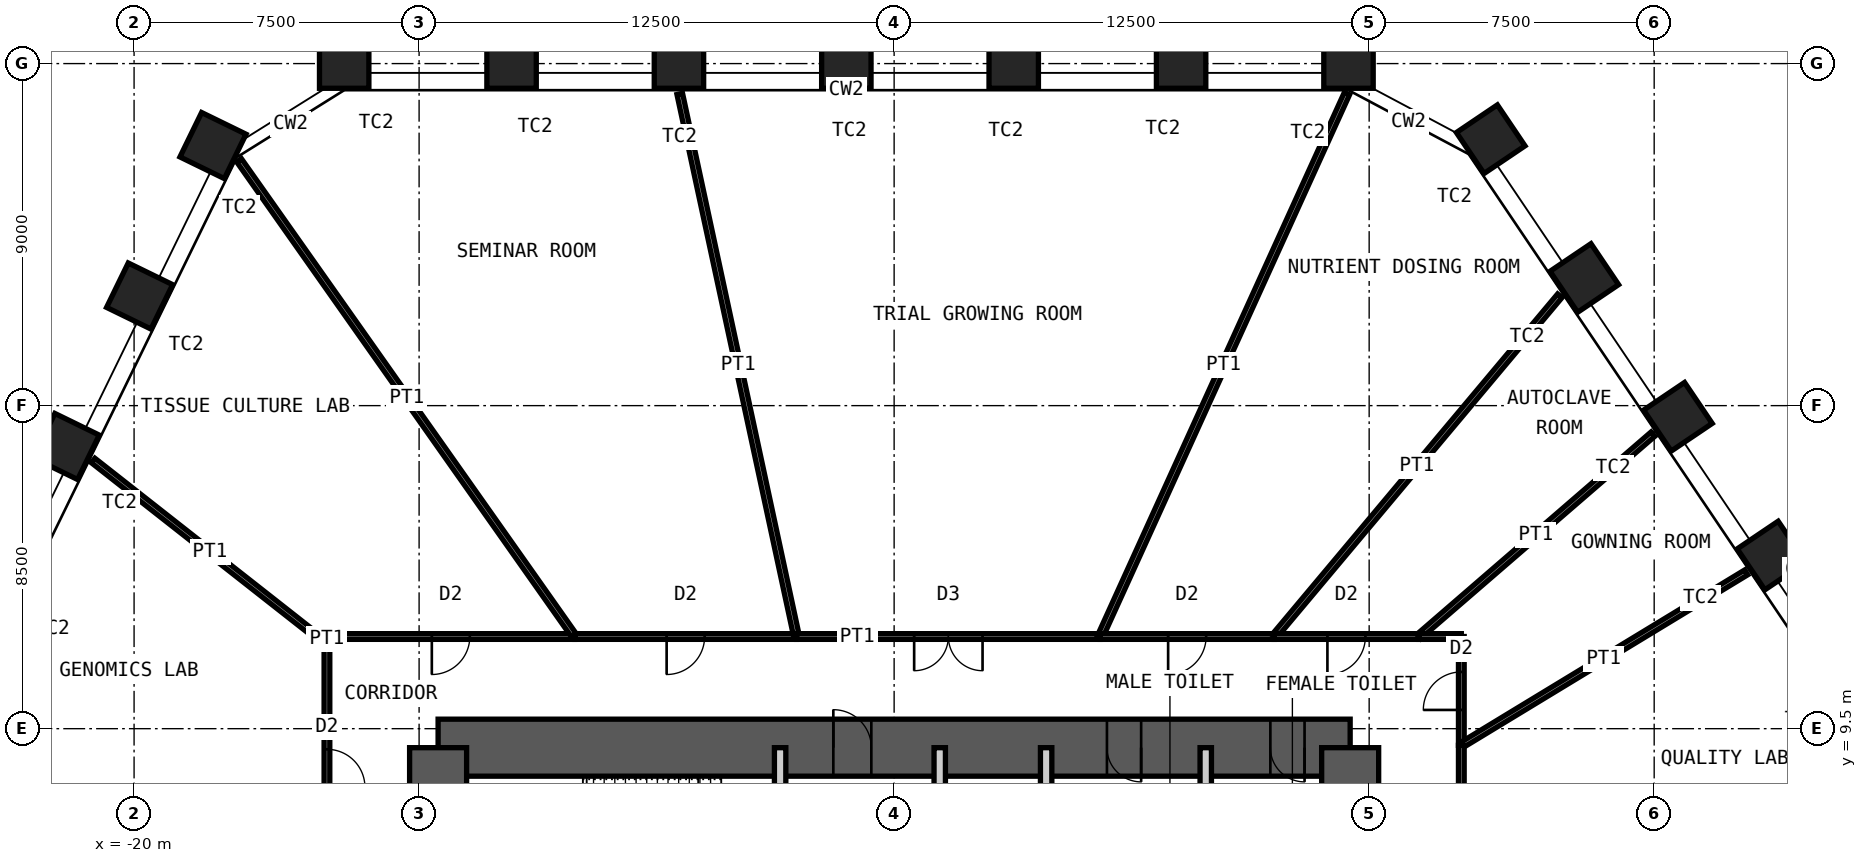
"""IFC4 building model, lengths in metres.
Left out: names, types, materials, properties, quantities, classifications, styles, units other than length and angle.
Written with IfcOpenShell. Run it as: python <this file> out.ifc"""

import sys

from ifc_helpers import new_model, si_unit, direction, frame, frame_2d, origin, origin_2d, place, context, subcontext, project, spatial, rectangle, hollow_rectangle, extrude, element, fill, save


model = new_model("IFC4")
c1 = context("Model", 3, precision=1e-05, world=origin(), true_north=direction((0.0, 1.0)))
c2 = subcontext(c1, "Body", "Model", "MODEL_VIEW")
j1 = project(units=[si_unit("LENGTHUNIT", "METRE"), si_unit("PLANEANGLEUNIT", "RADIAN")], contexts=[c1])
p1 = place(None, origin())
s1 = spatial("IfcSite", under=j1, at=p1, CompositionType="ELEMENT")
p2 = place(p1, origin())
s2 = spatial("IfcBuilding", under=s1, at=p2, CompositionType="ELEMENT")
p3 = place(p2, frame((0.0, 0.0, 82.0)))
s3 = spatial("IfcBuildingStorey", under=s2, at=p3, CompositionType="ELEMENT", Elevation=82.0)
for number, where, z_axis, x_axis in (
    (1, (-14.471, 27.0, 0.0), (0.0, 0.0, 1.0), (-1.0, 0.0, 0.0)),
    (2, (-10.067, 27.0, 0.0), (0.0, 0.0, 1.0), (-1.0, 0.0, 0.0)),
    (3, (-5.662, 27.0, 0.0), (0.0, 0.0, 1.0), (-1.0, 0.0, 0.0)),
    (4, (-1.258, 27.0, 0.0), (0.0, 0.0, 1.0), (-1.0, 0.0, 0.0)),
    (5, (3.147, 27.0, 0.0), (0.0, 0.0, 1.0), (-1.0, 0.0, 0.0)),
    (6, (7.552, 27.0, 0.0), (0.0, 0.0, 1.0), (-1.0, 0.0, 0.0)),
    (7, (11.956, 27.0, 0.0), (0.0, 0.0, 1.0), (-1.0, 0.0, 0.0)),
    (8, (15.698, 25.01, 0.0), (0.0, 0.0, 1.0), (-0.559, 0.829, 0.0)),
    (9, (18.161, 21.359, 0.0), (0.0, 0.0, 1.0), (-0.559, 0.829, 0.0)),
    (10, (20.624, 17.707, 0.0), (0.0, 0.0, 1.0), (-0.559, 0.829, 0.0)),
    (11, (23.087, 14.056, 0.0), (0.0, 0.0, 1.0), (-0.559, 0.829, 0.0)),
    (12, (-21.785, 16.925, 0.0), (0.0, 0.0, 1.0), (-0.438, -0.899, 0.0)),
    (13, (-19.854, 20.884, 0.0), (0.0, 0.0, 1.0), (-0.438, -0.899, 0.0)),
    (14, (-17.924, 24.843, 0.0), (0.0, 0.0, 1.0), (-0.438, -0.899, 0.0)),
):
    element("IfcColumn", number, at=place(p3, frame(where, z_axis=z_axis, x_axis=x_axis)), inside=s3, PredefinedType="COLUMN", context=c2, shape_type="SweptSolid", body=[
        extrude(hollow_rectangle(XDim=1.3, YDim=1.3, WallThickness=0.1, at=origin_2d()), origin(), (0.0, 0.0, 1.0), 5.0),
    ])
p4 = place(p3, frame((-12.0, 9.0, 0.0), z_axis=(0.0, 0.0, 1.0), x_axis=(1.0, 0.0, 0.0)))
e15 = element("IfcWall", 15, at=p4, inside=s3, PredefinedType="SHEAR", context=c2, shape_type="SweptSolid", body=[
    extrude(rectangle(XDim=24.0, YDim=1.5, at=frame_2d((12.0, 0.0))), origin(), (0.0, 0.0, 1.0), 5.0),
])
p5 = place(p4, frame((10.4, 0.0, 0.0)))
e16 = element("IfcOpeningElement", 16, at=p5, cuts=e15, PredefinedType="OPENING", context=c2, shape_type="SweptSolid", body=[
    extrude(rectangle(XDim=1.0, YDim=2.1, at=frame_2d((0.5, 1.05))), frame((0.0, 0.76, 0.0), z_axis=(0.0, -1.0, 0.0), x_axis=(1.0, 0.0, 0.0)), (0.0, 0.0, 1.0), 1.52),
])
p6 = place(p4, frame((17.6, 0.0, 0.0)))
e17 = element("IfcOpeningElement", 17, at=p6, cuts=e15, PredefinedType="OPENING", context=c2, shape_type="SweptSolid", body=[
    extrude(rectangle(XDim=0.9, YDim=2.1, at=frame_2d((0.45, 1.05))), frame((0.0, 0.76, 0.0), z_axis=(0.0, -1.0, 0.0), x_axis=(1.0, 0.0, 0.0)), (0.0, 0.0, 1.0), 1.52),
])
p7 = place(p4, frame((21.9, 0.0, 0.0)))
e18 = element("IfcOpeningElement", 18, at=p7, cuts=e15, PredefinedType="OPENING", context=c2, shape_type="SweptSolid", body=[
    extrude(rectangle(XDim=0.9, YDim=2.1, at=frame_2d((0.45, 1.05))), frame((0.0, 0.76, 0.0), z_axis=(0.0, -1.0, 0.0), x_axis=(1.0, 0.0, 0.0)), (0.0, 0.0, 1.0), 1.52),
])
p8 = place(p3, frame((12.0, -9.0, 0.0), z_axis=(0.0, 0.0, 1.0), x_axis=(0.0, 1.0, 0.0)))
e19 = element("IfcWall", 19, at=p8, inside=s3, PredefinedType="SHEAR", context=c2, shape_type="SweptSolid", body=[
    extrude(rectangle(XDim=18.0, YDim=1.5, at=frame_2d((9.0, 0.0))), origin(), (0.0, 0.0, 1.0), 5.0),
])
p9 = place(p8, frame((8.1, 0.0, 0.0)))
e20 = element("IfcOpeningElement", 20, at=p9, cuts=e19, PredefinedType="OPENING", context=c2, shape_type="SweptSolid", body=[
    extrude(rectangle(XDim=1.8, YDim=2.1, at=frame_2d((0.9, 1.05))), frame((0.0, 0.76, 0.0), z_axis=(0.0, -1.0, 0.0), x_axis=(1.0, 0.0, 0.0)), (0.0, 0.0, 1.0), 1.52),
])
p10 = place(p3, frame((-12.0, -9.0, 0.0), z_axis=(0.0, 0.0, 1.0), x_axis=(0.0, 1.0, 0.0)))
e21 = element("IfcWall", 21, at=p10, inside=s3, PredefinedType="SHEAR", context=c2, shape_type="SweptSolid", body=[
    extrude(rectangle(XDim=18.0, YDim=1.5, at=frame_2d((9.0, 0.0))), origin(), (0.0, 0.0, 1.0), 5.0),
])
p11 = place(p10, frame((8.1, 0.0, 0.0)))
e22 = element("IfcOpeningElement", 22, at=p11, cuts=e21, PredefinedType="OPENING", context=c2, shape_type="SweptSolid", body=[
    extrude(rectangle(XDim=1.8, YDim=2.1, at=frame_2d((0.9, 1.05))), frame((0.0, 0.76, 0.0), z_axis=(0.0, -1.0, 0.0), x_axis=(1.0, 0.0, 0.0)), (0.0, 0.0, 1.0), 1.52),
])
p12 = place(p3, frame((-3.0, 5.15, 0.0), z_axis=(0.0, 0.0, 1.0), x_axis=(0.0, 1.0, 0.0)))
e23 = element("IfcWall", 23, at=p12, inside=s3, PredefinedType="PARTITIONING", context=c2, shape_type="SweptSolid", body=[
    extrude(rectangle(XDim=3.85, YDim=0.3, at=frame_2d((1.925, 0.0))), origin(), (0.0, 0.0, 1.0), 4.78),
])
p13 = place(p12, frame((1.425, 0.0, 0.0)))
e24 = element("IfcOpeningElement", 24, at=p13, cuts=e23, PredefinedType="OPENING", context=c2, shape_type="SweptSolid", body=[
    extrude(rectangle(XDim=1.0, YDim=2.1, at=frame_2d((0.5, 1.05))), frame((0.0, 0.16, 0.0), z_axis=(0.0, -1.0, 0.0), x_axis=(1.0, 0.0, 0.0)), (0.0, 0.0, 1.0), 0.32),
])
p14 = place(p3, frame((1.2, 5.15, 0.0), z_axis=(0.0, 0.0, 1.0), x_axis=(0.0, 1.0, 0.0)))
e25 = element("IfcWall", 25, at=p14, inside=s3, PredefinedType="PARTITIONING", context=c2, shape_type="SweptSolid", body=[
    extrude(rectangle(XDim=3.85, YDim=0.3, at=frame_2d((1.925, 0.0))), origin(), (0.0, 0.0, 1.0), 4.78),
])
p15 = place(p14, frame((1.375, 0.0, 0.0)))
e26 = element("IfcOpeningElement", 26, at=p15, cuts=e25, PredefinedType="OPENING", context=c2, shape_type="SweptSolid", body=[
    extrude(rectangle(XDim=1.1, YDim=2.4, at=frame_2d((0.55, 1.2))), frame((0.0, 0.16, 0.0), z_axis=(0.0, -1.0, 0.0), x_axis=(1.0, 0.0, 0.0)), (0.0, 0.0, 1.0), 0.32),
])
for number, where, z_axis, x_axis in (
    (27, (4.0, 5.15, 0.0), (0.0, 0.0, 1.0), (0.0, 1.0, 0.0)),
    (28, (8.2, 5.15, 0.0), (0.0, 0.0, 1.0), (0.0, 1.0, 0.0)),
):
    element("IfcWall", number, at=place(p3, frame(where, z_axis=z_axis, x_axis=x_axis)), inside=s3, PredefinedType="PARTITIONING", context=c2, shape_type="SweptSolid", body=[
        extrude(rectangle(XDim=3.85, YDim=0.3, at=frame_2d((1.925, 0.0))), origin(), (0.0, 0.0, 1.0), 4.78),
    ])
p16 = place(p3, frame((-24.923, 8.668, 0.0), z_axis=(0.0, 0.0, 1.0), x_axis=(0.944507686068, -0.328489316354, 0.0)))
e29 = element("IfcWall", 29, at=p16, inside=s3, PredefinedType="PARTITIONING", context=c2, shape_type="SweptSolid", body=[
    extrude(rectangle(XDim=10.586, YDim=0.15, at=frame_2d((5.293, 0.0))), origin(), (0.0, 0.0, 1.0), 3.7),
])
p17 = place(p3, frame((-14.925, 5.191, 0.0), z_axis=(0.0, 0.0, 1.0), x_axis=(0.0, 1.0, 0.0)))
e30 = element("IfcWall", 30, at=p17, inside=s3, PredefinedType="PARTITIONING", context=c2, shape_type="SweptSolid", body=[
    extrude(rectangle(XDim=6.533, YDim=0.15, at=frame_2d((3.267, 0.0))), origin(), (0.0, 0.0, 1.0), 4.8),
])
p18 = place(p17, frame((2.767, 0.0, 0.0)))
e31 = element("IfcOpeningElement", 31, at=p18, cuts=e30, PredefinedType="OPENING", context=c2, shape_type="SweptSolid", body=[
    extrude(rectangle(XDim=1.0, YDim=2.4, at=frame_2d((0.5, 1.2))), frame((0.0, 0.085, 0.0), z_axis=(0.0, -1.0, 0.0), x_axis=(1.0, 0.0, 0.0)), (0.0, 0.0, 1.0), 0.17),
])
p19 = place(p3, frame((-21.077, 16.557, 0.0), z_axis=(0.0, 0.0, 1.0), x_axis=(0.78639413325, -0.617725074115, 0.0)))
e32 = element("IfcWall", 32, at=p19, inside=s3, PredefinedType="PARTITIONING", context=c2, shape_type="SweptSolid", body=[
    extrude(rectangle(XDim=7.823, YDim=0.15, at=frame_2d((3.912, 0.0))), origin(), (0.0, 0.0, 1.0), 3.7),
])
p20 = place(p3, frame((-14.925, 11.819, 0.0), z_axis=(0.0, 0.0, 1.0), x_axis=(0.0, 1.0, 0.0)))
e33 = element("IfcWall", 33, at=p20, inside=s3, PredefinedType="PARTITIONING", context=c2, shape_type="SweptSolid", body=[
    extrude(rectangle(XDim=0.106, YDim=0.15, at=frame_2d((0.053, 0.0))), origin(), (0.0, 0.0, 1.0), 4.8),
])
p21 = place(p3, frame((-14.925, 11.925, 0.0), z_axis=(0.0, 0.0, 1.0), x_axis=(1.0, 0.0, 0.0)))
e34 = element("IfcWall", 34, at=p21, inside=s3, PredefinedType="PARTITIONING", context=c2, shape_type="SweptSolid", body=[
    extrude(rectangle(XDim=6.52, YDim=0.15, at=frame_2d((3.26, 0.0))), origin(), (0.0, 0.0, 1.0), 4.8),
])
p22 = place(p21, frame((2.76, 0.0, 0.0)))
e35 = element("IfcOpeningElement", 35, at=p22, cuts=e34, PredefinedType="OPENING", context=c2, shape_type="SweptSolid", body=[
    extrude(rectangle(XDim=1.0, YDim=2.4, at=frame_2d((0.5, 1.2))), frame((0.0, 0.085, 0.0), z_axis=(0.0, -1.0, 0.0), x_axis=(1.0, 0.0, 0.0)), (0.0, 0.0, 1.0), 0.17),
])
p23 = place(p3, frame((-17.237, 24.454, 0.0), z_axis=(0.0, 0.0, 1.0), x_axis=(0.576120914166, -0.817364479446, 0.0)))
e36 = element("IfcWall", 36, at=p23, inside=s3, PredefinedType="PARTITIONING", context=c2, shape_type="SweptSolid", body=[
    extrude(rectangle(XDim=15.329, YDim=0.15, at=frame_2d((7.665, 0.0))), origin(), (0.0, 0.0, 1.0), 3.7),
])
p24 = place(p3, frame((-8.406, 11.925, 0.0), z_axis=(0.0, 0.0, 1.0), x_axis=(1.0, 0.0, 0.0)))
e37 = element("IfcWall", 37, at=p24, inside=s3, PredefinedType="PARTITIONING", context=c2, shape_type="SweptSolid", body=[
    extrude(rectangle(XDim=5.838, YDim=0.15, at=frame_2d((2.919, 0.0))), origin(), (0.0, 0.0, 1.0), 4.8),
])
p25 = place(p24, frame((2.419, 0.0, 0.0)))
e38 = element("IfcOpeningElement", 38, at=p25, cuts=e37, PredefinedType="OPENING", context=c2, shape_type="SweptSolid", body=[
    extrude(rectangle(XDim=1.0, YDim=2.4, at=frame_2d((0.5, 1.2))), frame((0.0, 0.085, 0.0), z_axis=(0.0, -1.0, 0.0), x_axis=(1.0, 0.0, 0.0)), (0.0, 0.0, 1.0), 0.17),
])
p26 = place(p3, frame((-5.641, 26.202, 0.0), z_axis=(0.0, 0.0, 1.0), x_axis=(0.210468575843, -0.977600623252, 0.0)))
e39 = element("IfcWall", 39, at=p26, inside=s3, PredefinedType="PARTITIONING", context=c2, shape_type="SweptSolid", body=[
    extrude(rectangle(XDim=14.604, YDim=0.15, at=frame_2d((7.302, 0.0))), origin(), (0.0, 0.0, 1.0), 3.7),
])
p27 = place(p3, frame((-2.567, 11.925, 0.0), z_axis=(0.0, 0.0, 1.0), x_axis=(1.0, 0.0, 0.0)))
e40 = element("IfcWall", 40, at=p27, inside=s3, PredefinedType="PARTITIONING", context=c2, shape_type="SweptSolid", body=[
    extrude(rectangle(XDim=7.989, YDim=0.15, at=frame_2d((3.994, 0.0))), origin(), (0.0, 0.0, 1.0), 4.8),
])
p28 = place(p27, frame((3.094, 0.0, 0.0)))
e41 = element("IfcOpeningElement", 41, at=p28, cuts=e40, PredefinedType="OPENING", context=c2, shape_type="SweptSolid", body=[
    extrude(rectangle(XDim=1.8, YDim=2.4, at=frame_2d((0.9, 1.2))), frame((0.0, 0.085, 0.0), z_axis=(0.0, -1.0, 0.0), x_axis=(1.0, 0.0, 0.0)), (0.0, 0.0, 1.0), 0.17),
])
p29 = place(p3, frame((11.915, 26.209, 0.0), z_axis=(0.0, 0.0, 1.0), x_axis=(-0.4138533524, -0.910343563007, 0.0)))
e42 = element("IfcWall", 42, at=p29, inside=s3, PredefinedType="PARTITIONING", context=c2, shape_type="SweptSolid", body=[
    extrude(rectangle(XDim=15.691, YDim=0.15, at=frame_2d((7.845, 0.0))), origin(), (0.0, 0.0, 1.0), 3.7),
])
p30 = place(p3, frame((5.421, 11.925, 0.0), z_axis=(0.0, 0.0, 1.0), x_axis=(1.0, 0.0, 0.0)))
e43 = element("IfcWall", 43, at=p30, inside=s3, PredefinedType="PARTITIONING", context=c2, shape_type="SweptSolid", body=[
    extrude(rectangle(XDim=4.578, YDim=0.15, at=frame_2d((2.289, 0.0))), origin(), (0.0, 0.0, 1.0), 4.8),
])
p31 = place(p30, frame((1.789, 0.0, 0.0)))
e44 = element("IfcOpeningElement", 44, at=p31, cuts=e43, PredefinedType="OPENING", context=c2, shape_type="SweptSolid", body=[
    extrude(rectangle(XDim=1.0, YDim=2.4, at=frame_2d((0.5, 1.2))), frame((0.0, 0.085, 0.0), z_axis=(0.0, -1.0, 0.0), x_axis=(1.0, 0.0, 0.0)), (0.0, 0.0, 1.0), 0.17),
])
p32 = place(p3, frame((17.517, 20.891, 0.0), z_axis=(0.0, 0.0, 1.0), x_axis=(-0.642515050703, -0.766273064658, 0.0)))
e45 = element("IfcWall", 45, at=p32, inside=s3, PredefinedType="PARTITIONING", context=c2, shape_type="SweptSolid", body=[
    extrude(rectangle(XDim=11.7, YDim=0.15, at=frame_2d((5.85, 0.0))), origin(), (0.0, 0.0, 1.0), 3.7),
])
p33 = place(p3, frame((9.999, 11.925, 0.0), z_axis=(0.0, 0.0, 1.0), x_axis=(1.0, 0.0, 0.0)))
e46 = element("IfcWall", 46, at=p33, inside=s3, PredefinedType="PARTITIONING", context=c2, shape_type="SweptSolid", body=[
    extrude(rectangle(XDim=3.805, YDim=0.15, at=frame_2d((1.902, 0.0))), origin(), (0.0, 0.0, 1.0), 4.8),
])
p34 = place(p33, frame((1.402, 0.0, 0.0)))
e47 = element("IfcOpeningElement", 47, at=p34, cuts=e46, PredefinedType="OPENING", context=c2, shape_type="SweptSolid", body=[
    extrude(rectangle(XDim=1.0, YDim=2.4, at=frame_2d((0.5, 1.2))), frame((0.0, 0.085, 0.0), z_axis=(0.0, -1.0, 0.0), x_axis=(1.0, 0.0, 0.0)), (0.0, 0.0, 1.0), 0.17),
])
p35 = place(p3, frame((19.968, 17.25, 0.0), z_axis=(0.0, 0.0, 1.0), x_axis=(-0.756733371925, -0.653723644834, 0.0)))
e48 = element("IfcWall", 48, at=p35, inside=s3, PredefinedType="PARTITIONING", context=c2, shape_type="SweptSolid", body=[
    extrude(rectangle(XDim=8.146, YDim=0.15, at=frame_2d((4.073, 0.0))), origin(), (0.0, 0.0, 1.0), 3.7),
])
p36 = place(p3, frame((13.804, 11.925, 0.0), z_axis=(0.0, 0.0, 1.0), x_axis=(1.0, 0.0, 0.0)))
e49 = element("IfcWall", 49, at=p36, inside=s3, PredefinedType="PARTITIONING", context=c2, shape_type="SweptSolid", body=[
    extrude(rectangle(XDim=1.121, YDim=0.15, at=frame_2d((0.561, 0.0))), origin(), (0.0, 0.0, 1.0), 4.8),
])
p37 = place(p3, frame((14.925, 11.925, 0.0), z_axis=(0.0, 0.0, 1.0), x_axis=(0.0, -1.0, 0.0)))
e50 = element("IfcWall", 50, at=p37, inside=s3, PredefinedType="PARTITIONING", context=c2, shape_type="SweptSolid", body=[
    extrude(rectangle(XDim=2.864, YDim=0.15, at=frame_2d((1.432, 0.0))), origin(), (0.0, 0.0, 1.0), 4.8),
])
p38 = place(p37, frame((0.932, 0.0, 0.0)))
e51 = element("IfcOpeningElement", 51, at=p38, cuts=e50, PredefinedType="OPENING", context=c2, shape_type="SweptSolid", body=[
    extrude(rectangle(XDim=1.0, YDim=2.4, at=frame_2d((0.5, 1.2))), frame((0.0, 0.085, 0.0), z_axis=(0.0, -1.0, 0.0), x_axis=(1.0, 0.0, 0.0)), (0.0, 0.0, 1.0), 0.17),
])
p39 = place(p3, frame((22.421, 13.612, 0.0), z_axis=(0.0, 0.0, 1.0), x_axis=(-0.854791484761, -0.518971596121, 0.0)))
e52 = element("IfcWall", 52, at=p39, inside=s3, PredefinedType="PARTITIONING", context=c2, shape_type="SweptSolid", body=[
    extrude(rectangle(XDim=8.77, YDim=0.15, at=frame_2d((4.385, 0.0))), origin(), (0.0, 0.0, 1.0), 3.7),
])
p40 = place(p3, frame((14.925, 9.061, 0.0), z_axis=(0.0, 0.0, 1.0), x_axis=(0.0, -1.0, 0.0)))
e53 = element("IfcWall", 53, at=p40, inside=s3, PredefinedType="PARTITIONING", context=c2, shape_type="SweptSolid", body=[
    extrude(rectangle(XDim=5.6, YDim=0.15, at=frame_2d((2.8, 0.0))), origin(), (0.0, 0.0, 1.0), 4.8),
])
p41 = place(p40, frame((2.3, 0.0, 0.0)))
e54 = element("IfcOpeningElement", 54, at=p41, cuts=e53, PredefinedType="OPENING", context=c2, shape_type="SweptSolid", body=[
    extrude(rectangle(XDim=1.0, YDim=2.4, at=frame_2d((0.5, 1.2))), frame((0.0, 0.085, 0.0), z_axis=(0.0, -1.0, 0.0), x_axis=(1.0, 0.0, 0.0)), (0.0, 0.0, 1.0), 0.17),
])
p42 = place(p5, origin())
e55 = element("IfcDoor", 55, at=p42, inside=s3, OperationType="SINGLE_SWING_RIGHT", PredefinedType="DOOR", context=c2, shape_type="SweptSolid", body=[
    extrude(rectangle(XDim=1.0, YDim=2.1, at=frame_2d((0.5, 1.05))), frame((0.0, 0.025, 0.0), z_axis=(0.0, -1.0, 0.0), x_axis=(1.0, 0.0, 0.0)), (0.0, 0.0, 1.0), 0.05),
])
fill(e16, e55)
p43 = place(p6, origin())
e56 = element("IfcDoor", 56, at=p43, inside=s3, OperationType="SINGLE_SWING_RIGHT", PredefinedType="DOOR", context=c2, shape_type="SweptSolid", body=[
    extrude(rectangle(XDim=0.9, YDim=2.1, at=frame_2d((0.45, 1.05))), frame((0.0, 0.025, 0.0), z_axis=(0.0, -1.0, 0.0), x_axis=(1.0, 0.0, 0.0)), (0.0, 0.0, 1.0), 0.05),
])
fill(e17, e56)
p44 = place(p7, origin())
e57 = element("IfcDoor", 57, at=p44, inside=s3, OperationType="SINGLE_SWING_RIGHT", PredefinedType="DOOR", context=c2, shape_type="SweptSolid", body=[
    extrude(rectangle(XDim=0.9, YDim=2.1, at=frame_2d((0.45, 1.05))), frame((0.0, 0.025, 0.0), z_axis=(0.0, -1.0, 0.0), x_axis=(1.0, 0.0, 0.0)), (0.0, 0.0, 1.0), 0.05),
])
fill(e18, e57)
p45 = place(p18, origin())
e58 = element("IfcDoor", 58, at=p45, inside=s3, OperationType="SINGLE_SWING_LEFT", PredefinedType="DOOR", context=c2, shape_type="SweptSolid", body=[
    extrude(rectangle(XDim=1.0, YDim=2.4, at=frame_2d((0.5, 1.2))), frame((0.0, 0.025, 0.0), z_axis=(0.0, -1.0, 0.0), x_axis=(1.0, 0.0, 0.0)), (0.0, 0.0, 1.0), 0.05),
])
fill(e31, e58)
p46 = place(p22, origin())
e59 = element("IfcDoor", 59, at=p46, inside=s3, OperationType="SINGLE_SWING_LEFT", PredefinedType="DOOR", context=c2, shape_type="SweptSolid", body=[
    extrude(rectangle(XDim=1.0, YDim=2.4, at=frame_2d((0.5, 1.2))), frame((0.0, 0.025, 0.0), z_axis=(0.0, -1.0, 0.0), x_axis=(1.0, 0.0, 0.0)), (0.0, 0.0, 1.0), 0.05),
])
fill(e35, e59)
p47 = place(p25, origin())
e60 = element("IfcDoor", 60, at=p47, inside=s3, OperationType="SINGLE_SWING_LEFT", PredefinedType="DOOR", context=c2, shape_type="SweptSolid", body=[
    extrude(rectangle(XDim=1.0, YDim=2.4, at=frame_2d((0.5, 1.2))), frame((0.0, 0.025, 0.0), z_axis=(0.0, -1.0, 0.0), x_axis=(1.0, 0.0, 0.0)), (0.0, 0.0, 1.0), 0.05),
])
fill(e38, e60)
p48 = place(p28, origin())
e61 = element("IfcDoor", 61, at=p48, inside=s3, OperationType="DOUBLE_DOOR_DOUBLE_SWING", PredefinedType="DOOR", context=c2, shape_type="SweptSolid", body=[
    extrude(rectangle(XDim=1.8, YDim=2.4, at=frame_2d((0.9, 1.2))), frame((0.0, 0.025, 0.0), z_axis=(0.0, -1.0, 0.0), x_axis=(1.0, 0.0, 0.0)), (0.0, 0.0, 1.0), 0.05),
])
fill(e41, e61)
p49 = place(p31, origin())
e62 = element("IfcDoor", 62, at=p49, inside=s3, OperationType="SINGLE_SWING_LEFT", PredefinedType="DOOR", context=c2, shape_type="SweptSolid", body=[
    extrude(rectangle(XDim=1.0, YDim=2.4, at=frame_2d((0.5, 1.2))), frame((0.0, 0.025, 0.0), z_axis=(0.0, -1.0, 0.0), x_axis=(1.0, 0.0, 0.0)), (0.0, 0.0, 1.0), 0.05),
])
fill(e44, e62)
p50 = place(p34, origin())
e63 = element("IfcDoor", 63, at=p50, inside=s3, OperationType="SINGLE_SWING_LEFT", PredefinedType="DOOR", context=c2, shape_type="SweptSolid", body=[
    extrude(rectangle(XDim=1.0, YDim=2.4, at=frame_2d((0.5, 1.2))), frame((0.0, 0.025, 0.0), z_axis=(0.0, -1.0, 0.0), x_axis=(1.0, 0.0, 0.0)), (0.0, 0.0, 1.0), 0.05),
])
fill(e47, e63)
p51 = place(p38, origin())
e64 = element("IfcDoor", 64, at=p51, inside=s3, OperationType="SINGLE_SWING_RIGHT", PredefinedType="DOOR", context=c2, shape_type="SweptSolid", body=[
    extrude(rectangle(XDim=1.0, YDim=2.4, at=frame_2d((0.5, 1.2))), frame((0.0, 0.025, 0.0), z_axis=(0.0, -1.0, 0.0), x_axis=(1.0, 0.0, 0.0)), (0.0, 0.0, 1.0), 0.05),
])
fill(e51, e64)
save(model, sys.argv[1])
